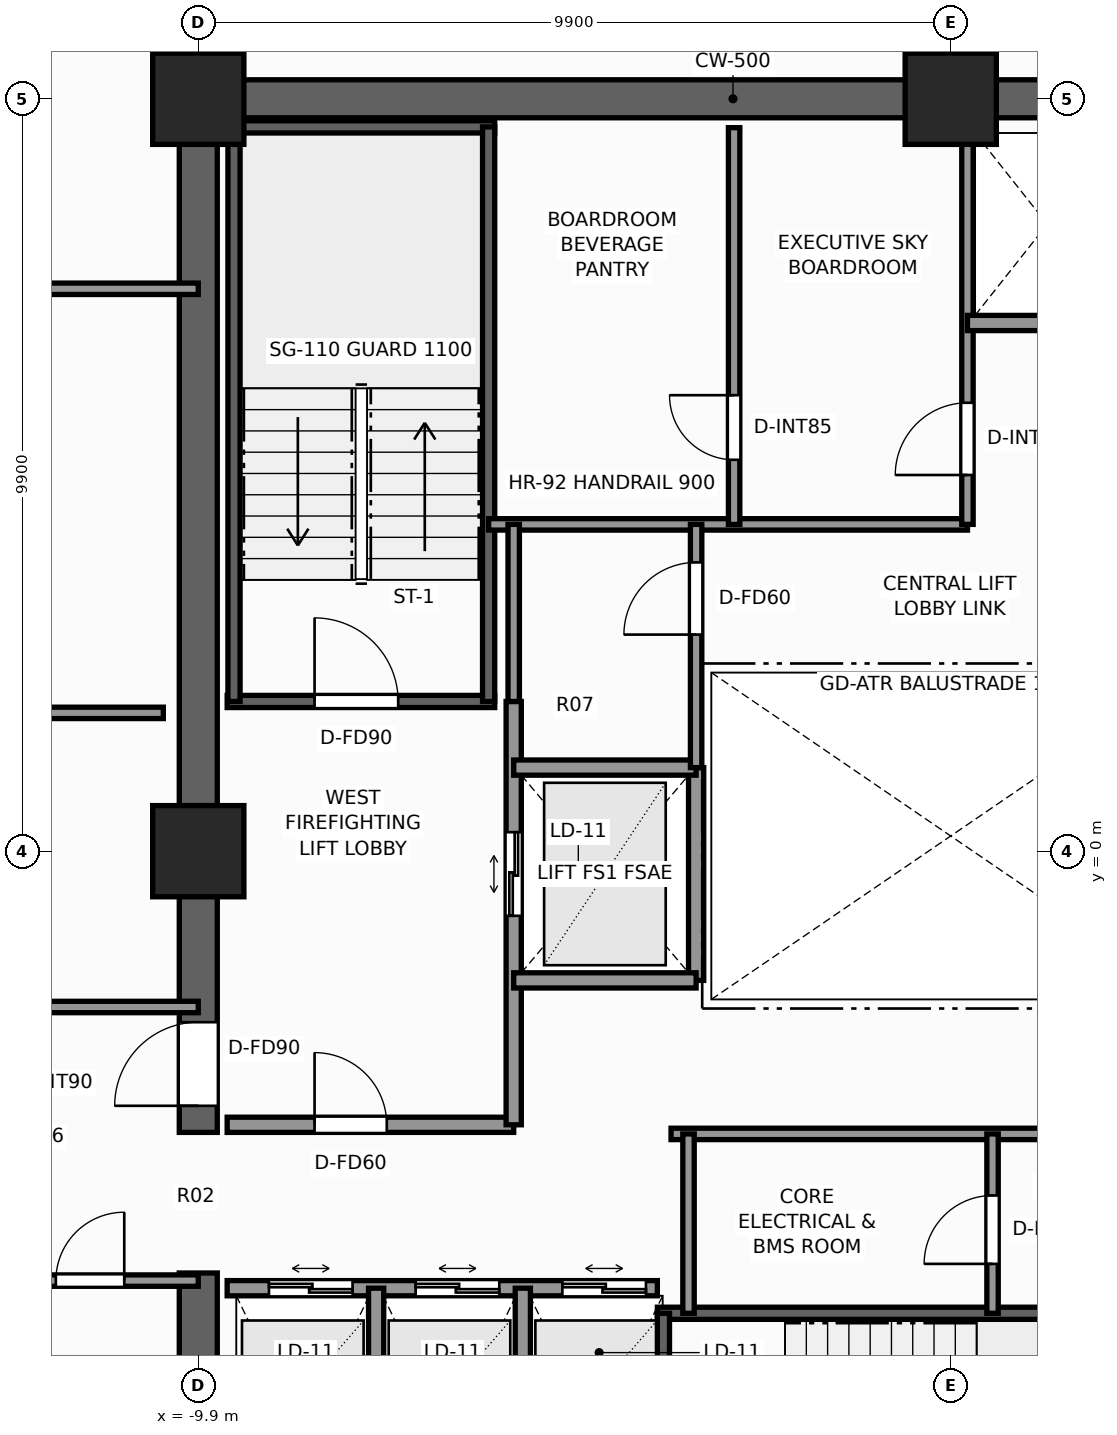
"""IFC4 building model, lengths in metres.
Left out: names, types, materials, properties, quantities, classifications, styles, units other than length and angle.
Written with IfcOpenShell. Run it as: python <this file> out.ifc"""

import sys

from ifc_helpers import new_model, si_unit, direction, frame, frame_2d, origin, origin_2d, place, context, subcontext, project, spatial, rectangle, extrude, element, fill, save


model = new_model("IFC4")
c1 = context("Model", 3, precision=1e-05, world=origin(), true_north=direction((0.0, 1.0)))
c2 = subcontext(c1, "Body", "Model", "MODEL_VIEW")
j1 = project(units=[si_unit("LENGTHUNIT", "METRE"), si_unit("PLANEANGLEUNIT", "RADIAN")], contexts=[c1])
p1 = place(None, origin())
s1 = spatial("IfcSite", under=j1, at=p1, CompositionType="ELEMENT")
p2 = place(p1, origin())
s2 = spatial("IfcBuilding", under=s1, at=p2, CompositionType="ELEMENT")
p3 = place(p2, frame((0.0, 0.0, 121.7)))
s3 = spatial("IfcBuildingStorey", under=s2, at=p3, CompositionType="ELEMENT", Elevation=121.7)
p4 = place(p3, frame((-10.15, 9.9, 0.0), z_axis=(0.0, 0.0, 1.0), x_axis=(1.0, 0.0, 0.0)))
e1 = element("IfcWall", 1, at=p4, inside=s3, PredefinedType="SHEAR", context=c2, shape_type="SweptSolid", body=[
    extrude(rectangle(XDim=14.57, YDim=0.5, at=frame_2d((7.285, 0.0))), origin(), (0.0, 0.0, 1.0), 3.3),
])
p5 = place(p3, frame((-9.9, -9.65, 0.0), z_axis=(0.0, 0.0, 1.0), x_axis=(0.0, 1.0, 0.0)))
e2 = element("IfcWall", 2, at=p5, inside=s3, PredefinedType="SHEAR", context=c2, shape_type="SweptSolid", body=[
    extrude(rectangle(XDim=4.1, YDim=0.5, at=frame_2d((2.05, 0.0))), origin(), (0.0, 0.0, 1.0), 3.3),
])
p6 = place(p3, frame((-9.9, -3.7, 0.0), z_axis=(0.0, 0.0, 1.0), x_axis=(0.0, 1.0, 0.0)))
e3 = element("IfcWall", 3, at=p6, inside=s3, PredefinedType="SHEAR", context=c2, shape_type="SweptSolid", body=[
    extrude(rectangle(XDim=13.35, YDim=0.5, at=frame_2d((6.675, 0.0))), origin(), (0.0, 0.0, 1.0), 3.3),
])
p7 = place(p6, frame((0.35, 0.0, 0.0)))
e4 = element("IfcOpeningElement", 4, at=p7, cuts=e3, PredefinedType="OPENING", context=c2, shape_type="SweptSolid", body=[
    extrude(rectangle(XDim=1.1, YDim=2.2, at=frame_2d((0.55, 1.1))), frame((0.0, 0.26, 0.0), z_axis=(0.0, -1.0, 0.0), x_axis=(1.0, 0.0, 0.0)), (0.0, 0.0, 1.0), 0.52),
])
for number, where, z_axis, x_axis in (
    (5, (-9.9, 9.9, 0.0), (0.0, 0.0, 1.0), (1.0, 0.0, 0.0)),
    (6, (0.0, 9.9, 0.0), (0.0, 0.0, 1.0), (1.0, 0.0, 0.0)),
    (7, (-9.9, 0.0, 0.0), (0.0, 0.0, 1.0), (1.0, 0.0, 0.0)),
):
    element("IfcColumn", number, at=place(p3, frame(where, z_axis=z_axis, x_axis=x_axis)), inside=s3, PredefinedType="COLUMN", context=c2, shape_type="SweptSolid", body=[
        extrude(rectangle(XDim=1.2, YDim=1.2, at=origin_2d()), origin(), (0.0, 0.0, 1.0), 3.3),
    ])
p8 = place(p3, frame((-9.52, 1.97, 0.0), z_axis=(0.0, 0.0, 1.0), x_axis=(1.0, 0.0, 0.0)))
e8 = element("IfcWall", 8, at=p8, inside=s3, PredefinedType="SHEAR", context=c2, shape_type="SweptSolid", body=[
    extrude(rectangle(XDim=3.52, YDim=0.16, at=frame_2d((1.76, 0.0))), origin(), (0.0, 0.0, 1.0), 3.3),
])
p9 = place(p8, frame((1.15, 0.0, 0.0)))
e9 = element("IfcOpeningElement", 9, at=p9, cuts=e8, PredefinedType="OPENING", context=c2, shape_type="SweptSolid", body=[
    extrude(rectangle(XDim=1.1, YDim=2.2, at=frame_2d((0.55, 1.1))), frame((0.0, 0.09, 0.0), z_axis=(0.0, -1.0, 0.0), x_axis=(1.0, 0.0, 0.0)), (0.0, 0.0, 1.0), 0.18),
])
p10 = place(p3, frame((-9.52, 9.53, 0.0), z_axis=(0.0, 0.0, 1.0), x_axis=(1.0, 0.0, 0.0)))
e10 = element("IfcWall", 10, at=p10, inside=s3, PredefinedType="SHEAR", context=c2, shape_type="SweptSolid", body=[
    extrude(rectangle(XDim=3.52, YDim=0.16, at=frame_2d((1.76, 0.0))), origin(), (0.0, 0.0, 1.0), 3.3),
])
for number, where, z_axis, x_axis in (
    (11, (-9.43, 1.97, 0.0), (0.0, 0.0, 1.0), (0.0, 1.0, 0.0)),
    (12, (-6.08, 1.97, 0.0), (0.0, 0.0, 1.0), (0.0, 1.0, 0.0)),
):
    element("IfcWall", number, at=place(p3, frame(where, z_axis=z_axis, x_axis=x_axis)), inside=s3, PredefinedType="SHEAR", context=c2, shape_type="SweptSolid", body=[
        extrude(rectangle(XDim=7.56, YDim=0.16, at=frame_2d((3.78, 0.0))), origin(), (0.0, 0.0, 1.0), 3.3),
    ])
p11 = place(p3, frame((-3.86, -6.08, 0.0), z_axis=(0.0, 0.0, 1.0), x_axis=(1.0, 0.0, 0.0)))
e13 = element("IfcWall", 13, at=p11, inside=s3, PredefinedType="SHEAR", context=c2, shape_type="SweptSolid", body=[
    extrude(rectangle(XDim=7.72, YDim=0.16, at=frame_2d((3.86, 0.0))), origin(), (0.0, 0.0, 1.0), 3.3),
])
p12 = place(p3, frame((-3.78, -9.43, 0.0), z_axis=(0.0, 0.0, 1.0), x_axis=(0.0, 1.0, 0.0)))
e14 = element("IfcWall", 14, at=p12, inside=s3, PredefinedType="SHEAR", context=c2, shape_type="SweptSolid", body=[
    extrude(rectangle(XDim=3.35, YDim=0.16, at=frame_2d((1.675, 0.0))), origin(), (0.0, 0.0, 1.0), 3.3),
])
p13 = place(p3, frame((-9.52, -3.6, 0.0), z_axis=(0.0, 0.0, 1.0), x_axis=(1.0, 0.0, 0.0)))
e15 = element("IfcWall", 15, at=p13, inside=s3, PredefinedType="SOLIDWALL", context=c2, shape_type="SweptSolid", body=[
    extrude(rectangle(XDim=3.77, YDim=0.2, at=frame_2d((1.885, 0.0))), origin(), (0.0, 0.0, 1.0), 3.08),
])
p14 = place(p13, frame((1.15, 0.0, 0.0)))
e16 = element("IfcOpeningElement", 16, at=p14, cuts=e15, PredefinedType="OPENING", context=c2, shape_type="SweptSolid", body=[
    extrude(rectangle(XDim=0.95, YDim=2.06, at=frame_2d((0.475, 1.03))), frame((0.0, 0.11, 0.0), z_axis=(0.0, -1.0, 0.0), x_axis=(1.0, 0.0, 0.0)), (0.0, 0.0, 1.0), 0.22),
])
p15 = place(p3, frame((-5.75, -3.6, 0.0), z_axis=(0.0, 0.0, 1.0), x_axis=(0.0, 1.0, 0.0)))
e17 = element("IfcWall", 17, at=p15, inside=s3, PredefinedType="SOLIDWALL", context=c2, shape_type="SweptSolid", body=[
    extrude(rectangle(XDim=5.57, YDim=0.2, at=frame_2d((2.785, 0.0))), origin(), (0.0, 0.0, 1.0), 2.715),
])
p16 = place(p15, frame((2.75, 0.0, 0.0)))
e18 = element("IfcOpeningElement", 18, at=p16, cuts=e17, PredefinedType="OPENING", context=c2, shape_type="SweptSolid", body=[
    extrude(rectangle(XDim=1.1, YDim=2.2, at=frame_2d((0.55, 1.1))), frame((0.0, 0.11, 0.0), z_axis=(0.0, -1.0, 0.0), x_axis=(1.0, 0.0, 0.0)), (0.0, 0.0, 1.0), 0.22),
])
p17 = place(p3, frame((-3.35, -1.7, 0.0), z_axis=(0.0, 0.0, 1.0), x_axis=(0.0, 1.0, 0.0)))
e19 = element("IfcWall", 19, at=p17, inside=s3, PredefinedType="SOLIDWALL", context=c2, shape_type="SweptSolid", body=[
    extrude(rectangle(XDim=2.8, YDim=0.2, at=frame_2d((1.4, 0.0))), origin(), (0.0, 0.0, 1.0), 2.715),
])
for number, where, z_axis, x_axis in (
    (20, (-5.75, -1.7, 0.0), (0.0, 0.0, 1.0), (1.0, 0.0, 0.0)),
    (21, (-5.75, 1.1, 0.0), (0.0, 0.0, 1.0), (1.0, 0.0, 0.0)),
):
    element("IfcWall", number, at=place(p3, frame(where, z_axis=z_axis, x_axis=x_axis)), inside=s3, PredefinedType="SOLIDWALL", context=c2, shape_type="SweptSolid", body=[
        extrude(rectangle(XDim=2.4, YDim=0.2, at=frame_2d((1.2, 0.0))), origin(), (0.0, 0.0, 1.0), 3.08),
    ])
p18 = place(p3, frame((-6.08, 4.3, 0.0), z_axis=(0.0, 0.0, 1.0), x_axis=(1.0, 0.0, 0.0)))
e22 = element("IfcWall", 22, at=p18, inside=s3, PredefinedType="PARTITIONING", context=c2, shape_type="SweptSolid", body=[
    extrude(rectangle(XDim=6.3, YDim=0.15, at=frame_2d((3.15, 0.0))), origin(), (0.0, 0.0, 1.0), 3.08),
])
p19 = place(p3, frame((0.22, 4.3, 0.0), z_axis=(0.0, 0.0, 1.0), x_axis=(0.0, 1.0, 0.0)))
e23 = element("IfcWall", 23, at=p19, inside=s3, PredefinedType="PARTITIONING", context=c2, shape_type="SweptSolid", body=[
    extrude(rectangle(XDim=5.22, YDim=0.15, at=frame_2d((2.61, 0.0))), origin(), (0.0, 0.0, 1.0), 3.08),
])
p20 = place(p19, frame((0.65, 0.0, 0.0)))
e24 = element("IfcOpeningElement", 24, at=p20, cuts=e23, PredefinedType="OPENING", context=c2, shape_type="SweptSolid", body=[
    extrude(rectangle(XDim=0.95, YDim=2.06, at=frame_2d((0.475, 1.03))), frame((0.0, 0.085, 0.0), z_axis=(0.0, -1.0, 0.0), x_axis=(1.0, 0.0, 0.0)), (0.0, 0.0, 1.0), 0.17),
])
p21 = place(p3, frame((-2.85, 4.3, 0.0), z_axis=(0.0, 0.0, 1.0), x_axis=(0.0, 1.0, 0.0)))
e25 = element("IfcWall", 25, at=p21, inside=s3, PredefinedType="PARTITIONING", context=c2, shape_type="SweptSolid", body=[
    extrude(rectangle(XDim=5.22, YDim=0.15, at=frame_2d((2.61, 0.0))), origin(), (0.0, 0.0, 1.0), 3.08),
])
p22 = place(p21, frame((0.85, 0.0, 0.0)))
e26 = element("IfcOpeningElement", 26, at=p22, cuts=e25, PredefinedType="OPENING", context=c2, shape_type="SweptSolid", body=[
    extrude(rectangle(XDim=0.85, YDim=2.03, at=frame_2d((0.425, 1.015))), frame((0.0, 0.085, 0.0), z_axis=(0.0, -1.0, 0.0), x_axis=(1.0, 0.0, 0.0)), (0.0, 0.0, 1.0), 0.17),
])
p23 = place(p3, frame((0.22, 6.95, 0.0), z_axis=(0.0, 0.0, 1.0), x_axis=(1.0, 0.0, 0.0)))
e27 = element("IfcWall", 27, at=p23, inside=s3, PredefinedType="SOLIDWALL", context=c2, shape_type="SweptSolid", body=[
    extrude(rectangle(XDim=4.18, YDim=0.2, at=frame_2d((2.09, 0.0))), origin(), (0.0, 0.0, 1.0), 3.08),
])
p24 = place(p3, frame((-9.52, -5.75, 0.0), z_axis=(0.0, 0.0, 1.0), x_axis=(1.0, 0.0, 0.0)))
e28 = element("IfcWall", 28, at=p24, inside=s3, PredefinedType="SOLIDWALL", context=c2, shape_type="SweptSolid", body=[
    extrude(rectangle(XDim=5.66, YDim=0.2, at=frame_2d((2.83, 0.0))), origin(), (0.0, 0.0, 1.0), 3.08),
])
p25 = place(p24, frame((0.55, 0.0, 0.0)))
e29 = element("IfcOpeningElement", 29, at=p25, cuts=e28, PredefinedType="OPENING", context=c2, shape_type="SweptSolid", body=[
    extrude(rectangle(XDim=1.1, YDim=2.2, at=frame_2d((0.55, 1.1))), frame((0.0, 0.11, 0.0), z_axis=(0.0, -1.0, 0.0), x_axis=(1.0, 0.0, 0.0)), (0.0, 0.0, 1.0), 0.22),
])
p26 = place(p24, frame((2.48, 0.0, 0.0)))
e30 = element("IfcOpeningElement", 30, at=p26, cuts=e28, PredefinedType="OPENING", context=c2, shape_type="SweptSolid", body=[
    extrude(rectangle(XDim=1.1, YDim=2.2, at=frame_2d((0.55, 1.1))), frame((0.0, 0.11, 0.0), z_axis=(0.0, -1.0, 0.0), x_axis=(1.0, 0.0, 0.0)), (0.0, 0.0, 1.0), 0.22),
])
p27 = place(p24, frame((4.41, 0.0, 0.0)))
e31 = element("IfcOpeningElement", 31, at=p27, cuts=e28, PredefinedType="OPENING", context=c2, shape_type="SweptSolid", body=[
    extrude(rectangle(XDim=1.1, YDim=2.2, at=frame_2d((0.55, 1.1))), frame((0.0, 0.11, 0.0), z_axis=(0.0, -1.0, 0.0), x_axis=(1.0, 0.0, 0.0)), (0.0, 0.0, 1.0), 0.22),
])
for number, where, z_axis, x_axis in (
    (32, (-7.56, -9.52, 0.0), (0.0, 0.0, 1.0), (0.0, 1.0, 0.0)),
    (33, (-5.63, -9.52, 0.0), (0.0, 0.0, 1.0), (0.0, 1.0, 0.0)),
):
    element("IfcWall", number, at=place(p3, frame(where, z_axis=z_axis, x_axis=x_axis)), inside=s3, PredefinedType="SOLIDWALL", context=c2, shape_type="SweptSolid", body=[
        extrude(rectangle(XDim=3.77, YDim=0.2, at=frame_2d((1.885, 0.0))), origin(), (0.0, 0.0, 1.0), 3.08),
    ])
p28 = place(p3, frame((-3.68, -3.72, 0.0), z_axis=(0.0, 0.0, 1.0), x_axis=(1.0, 0.0, 0.0)))
e34 = element("IfcWall", 34, at=p28, inside=s3, PredefinedType="PARTITIONING", context=c2, shape_type="SweptSolid", body=[
    extrude(rectangle(XDim=7.36, YDim=0.15, at=frame_2d((3.68, 0.0))), origin(), (0.0, 0.0, 1.0), 3.08),
])
p29 = place(p3, frame((-3.45, -6.08, 0.0), z_axis=(0.0, 0.0, 1.0), x_axis=(0.0, 1.0, 0.0)))
e35 = element("IfcWall", 35, at=p29, inside=s3, PredefinedType="PARTITIONING", context=c2, shape_type="SweptSolid", body=[
    extrude(rectangle(XDim=2.36, YDim=0.15, at=frame_2d((1.18, 0.0))), origin(), (0.0, 0.0, 1.0), 3.08),
])
p30 = place(p3, frame((0.55, -6.08, 0.0), z_axis=(0.0, 0.0, 1.0), x_axis=(0.0, 1.0, 0.0)))
e36 = element("IfcWall", 36, at=p30, inside=s3, PredefinedType="PARTITIONING", context=c2, shape_type="SweptSolid", body=[
    extrude(rectangle(XDim=2.36, YDim=0.15, at=frame_2d((1.18, 0.0))), origin(), (0.0, 0.0, 1.0), 3.08),
])
p31 = place(p30, frame((0.65, 0.0, 0.0)))
e37 = element("IfcOpeningElement", 37, at=p31, cuts=e36, PredefinedType="OPENING", context=c2, shape_type="SweptSolid", body=[
    extrude(rectangle(XDim=0.9, YDim=2.06, at=frame_2d((0.45, 1.03))), frame((0.0, 0.085, 0.0), z_axis=(0.0, -1.0, 0.0), x_axis=(1.0, 0.0, 0.0)), (0.0, 0.0, 1.0), 0.17),
])
p32 = place(p3, frame((-3.35, 1.1, 0.0), z_axis=(0.0, 0.0, 1.0), x_axis=(0.0, 1.0, 0.0)))
e38 = element("IfcWall", 38, at=p32, inside=s3, PredefinedType="PARTITIONING", context=c2, shape_type="SweptSolid", body=[
    extrude(rectangle(XDim=3.2, YDim=0.15, at=frame_2d((1.6, 0.0))), origin(), (0.0, 0.0, 1.0), 2.715),
])
p33 = place(p32, frame((1.75, 0.0, 0.0)))
e39 = element("IfcOpeningElement", 39, at=p33, cuts=e38, PredefinedType="OPENING", context=c2, shape_type="SweptSolid", body=[
    extrude(rectangle(XDim=0.95, YDim=2.06, at=frame_2d((0.475, 1.03))), frame((0.0, 0.085, 0.0), z_axis=(0.0, -1.0, 0.0), x_axis=(1.0, 0.0, 0.0)), (0.0, 0.0, 1.0), 0.17),
])
p34 = place(p3, frame((-5.75, 1.97, 0.0), z_axis=(0.0, 0.0, 1.0), x_axis=(0.0, 1.0, 0.0)))
e40 = element("IfcWall", 40, at=p34, inside=s3, PredefinedType="PARTITIONING", context=c2, shape_type="SweptSolid", body=[
    extrude(rectangle(XDim=2.33, YDim=0.15, at=frame_2d((1.165, 0.0))), origin(), (0.0, 0.0, 1.0), 2.715),
])
for number, where, z_axis, x_axis in (
    (41, (-12.58, 7.4, 0.0), (0.0, 0.0, 1.0), (1.0, 0.0, 0.0)),
    (42, (-12.58, -2.05, 0.0), (0.0, 0.0, 1.0), (1.0, 0.0, 0.0)),
):
    element("IfcWall", number, at=place(p3, frame(where, z_axis=z_axis, x_axis=x_axis)), inside=s3, PredefinedType="PARTITIONING", context=c2, shape_type="SweptSolid", body=[
        extrude(rectangle(XDim=2.68, YDim=0.15, at=frame_2d((1.34, 0.0))), origin(), (0.0, 0.0, 1.0), 3.08),
    ])
p35 = place(p3, frame((-12.58, -5.65, 0.0), z_axis=(0.0, 0.0, 1.0), x_axis=(1.0, 0.0, 0.0)))
e43 = element("IfcWall", 43, at=p35, inside=s3, PredefinedType="PARTITIONING", context=c2, shape_type="SweptSolid", body=[
    extrude(rectangle(XDim=2.68, YDim=0.15, at=frame_2d((1.34, 0.0))), origin(), (0.0, 0.0, 1.0), 3.08),
])
p36 = place(p35, frame((0.806, 0.0, 0.0)))
e44 = element("IfcOpeningElement", 44, at=p36, cuts=e43, PredefinedType="OPENING", context=c2, shape_type="SweptSolid", body=[
    extrude(rectangle(XDim=0.9, YDim=2.06, at=frame_2d((0.45, 1.03))), frame((0.0, 0.085, 0.0), z_axis=(0.0, -1.0, 0.0), x_axis=(1.0, 0.0, 0.0)), (0.0, 0.0, 1.0), 0.17),
])
p37 = place(p3, frame((-19.08, 1.82, 0.0), z_axis=(0.0, 0.0, 1.0), x_axis=(1.0, 0.0, 0.0)))
e45 = element("IfcWall", 45, at=p37, inside=s3, PredefinedType="PARTITIONING", context=c2, shape_type="SweptSolid", body=[
    extrude(rectangle(XDim=8.72, YDim=0.15, at=frame_2d((4.36, 0.0))), origin(), (0.0, 0.0, 1.0), 2.449),
])
p38 = place(p9, origin())
e46 = element("IfcDoor", 46, at=p38, inside=s3, OperationType="SINGLE_SWING_LEFT", PredefinedType="DOOR", context=c2, shape_type="SweptSolid", body=[
    extrude(rectangle(XDim=1.1, YDim=2.2, at=frame_2d((0.55, 1.1))), frame((0.0, 0.025, 0.0), z_axis=(0.0, -1.0, 0.0), x_axis=(1.0, 0.0, 0.0)), (0.0, 0.0, 1.0), 0.05),
])
fill(e9, e46)
p39 = place(p7, origin())
e47 = element("IfcDoor", 47, at=p39, inside=s3, OperationType="SINGLE_SWING_LEFT", PredefinedType="DOOR", context=c2, shape_type="SweptSolid", body=[
    extrude(rectangle(XDim=1.1, YDim=2.2, at=frame_2d((0.55, 1.1))), frame((0.0, 0.025, 0.0), z_axis=(0.0, -1.0, 0.0), x_axis=(1.0, 0.0, 0.0)), (0.0, 0.0, 1.0), 0.05),
])
fill(e4, e47)
p40 = place(p16, origin())
e48 = element("IfcDoor", 48, at=p40, inside=s3, OperationType="DOUBLE_DOOR_SLIDING", PredefinedType="DOOR", context=c2, shape_type="SweptSolid", body=[
    extrude(rectangle(XDim=1.1, YDim=2.2, at=frame_2d((0.55, 1.1))), frame((0.0, 0.025, 0.0), z_axis=(0.0, -1.0, 0.0), x_axis=(1.0, 0.0, 0.0)), (0.0, 0.0, 1.0), 0.05),
])
fill(e18, e48)
p41 = place(p20, origin())
e49 = element("IfcDoor", 49, at=p41, inside=s3, OperationType="SINGLE_SWING_LEFT", PredefinedType="DOOR", context=c2, shape_type="SweptSolid", body=[
    extrude(rectangle(XDim=0.95, YDim=2.06, at=frame_2d((0.475, 1.03))), frame((0.0, 0.025, 0.0), z_axis=(0.0, -1.0, 0.0), x_axis=(1.0, 0.0, 0.0)), (0.0, 0.0, 1.0), 0.05),
])
fill(e24, e49)
p42 = place(p22, origin())
e50 = element("IfcDoor", 50, at=p42, inside=s3, OperationType="SINGLE_SWING_RIGHT", PredefinedType="DOOR", context=c2, shape_type="SweptSolid", body=[
    extrude(rectangle(XDim=0.85, YDim=2.03, at=frame_2d((0.425, 1.015))), frame((0.0, 0.025, 0.0), z_axis=(0.0, -1.0, 0.0), x_axis=(1.0, 0.0, 0.0)), (0.0, 0.0, 1.0), 0.05),
])
fill(e26, e50)
p43 = place(p25, origin())
e51 = element("IfcDoor", 51, at=p43, inside=s3, OperationType="DOUBLE_DOOR_SLIDING", PredefinedType="DOOR", context=c2, shape_type="SweptSolid", body=[
    extrude(rectangle(XDim=1.1, YDim=2.2, at=frame_2d((0.55, 1.1))), frame((0.0, 0.025, 0.0), z_axis=(0.0, -1.0, 0.0), x_axis=(1.0, 0.0, 0.0)), (0.0, 0.0, 1.0), 0.05),
])
fill(e29, e51)
p44 = place(p26, origin())
e52 = element("IfcDoor", 52, at=p44, inside=s3, OperationType="DOUBLE_DOOR_SLIDING", PredefinedType="DOOR", context=c2, shape_type="SweptSolid", body=[
    extrude(rectangle(XDim=1.1, YDim=2.2, at=frame_2d((0.55, 1.1))), frame((0.0, 0.025, 0.0), z_axis=(0.0, -1.0, 0.0), x_axis=(1.0, 0.0, 0.0)), (0.0, 0.0, 1.0), 0.05),
])
fill(e30, e52)
p45 = place(p27, origin())
e53 = element("IfcDoor", 53, at=p45, inside=s3, OperationType="DOUBLE_DOOR_SLIDING", PredefinedType="DOOR", context=c2, shape_type="SweptSolid", body=[
    extrude(rectangle(XDim=1.1, YDim=2.2, at=frame_2d((0.55, 1.1))), frame((0.0, 0.025, 0.0), z_axis=(0.0, -1.0, 0.0), x_axis=(1.0, 0.0, 0.0)), (0.0, 0.0, 1.0), 0.05),
])
fill(e31, e53)
p46 = place(p14, origin())
e54 = element("IfcDoor", 54, at=p46, inside=s3, OperationType="SINGLE_SWING_LEFT", PredefinedType="DOOR", context=c2, shape_type="SweptSolid", body=[
    extrude(rectangle(XDim=0.95, YDim=2.06, at=frame_2d((0.475, 1.03))), frame((0.0, 0.025, 0.0), z_axis=(0.0, -1.0, 0.0), x_axis=(1.0, 0.0, 0.0)), (0.0, 0.0, 1.0), 0.05),
])
fill(e16, e54)
p47 = place(p31, origin())
e55 = element("IfcDoor", 55, at=p47, inside=s3, OperationType="SINGLE_SWING_LEFT", PredefinedType="DOOR", context=c2, shape_type="SweptSolid", body=[
    extrude(rectangle(XDim=0.9, YDim=2.06, at=frame_2d((0.45, 1.03))), frame((0.0, 0.025, 0.0), z_axis=(0.0, -1.0, 0.0), x_axis=(1.0, 0.0, 0.0)), (0.0, 0.0, 1.0), 0.05),
])
fill(e37, e55)
p48 = place(p33, origin())
e56 = element("IfcDoor", 56, at=p48, inside=s3, OperationType="SINGLE_SWING_LEFT", PredefinedType="DOOR", context=c2, shape_type="SweptSolid", body=[
    extrude(rectangle(XDim=0.95, YDim=2.06, at=frame_2d((0.475, 1.03))), frame((0.0, 0.025, 0.0), z_axis=(0.0, -1.0, 0.0), x_axis=(1.0, 0.0, 0.0)), (0.0, 0.0, 1.0), 0.05),
])
fill(e39, e56)
p49 = place(p36, origin())
e57 = element("IfcDoor", 57, at=p49, inside=s3, OperationType="SINGLE_SWING_RIGHT", PredefinedType="DOOR", context=c2, shape_type="SweptSolid", body=[
    extrude(rectangle(XDim=0.9, YDim=2.06, at=frame_2d((0.45, 1.03))), frame((0.0, 0.025, 0.0), z_axis=(0.0, -1.0, 0.0), x_axis=(1.0, 0.0, 0.0)), (0.0, 0.0, 1.0), 0.05),
])
fill(e44, e57)
save(model, sys.argv[1])
